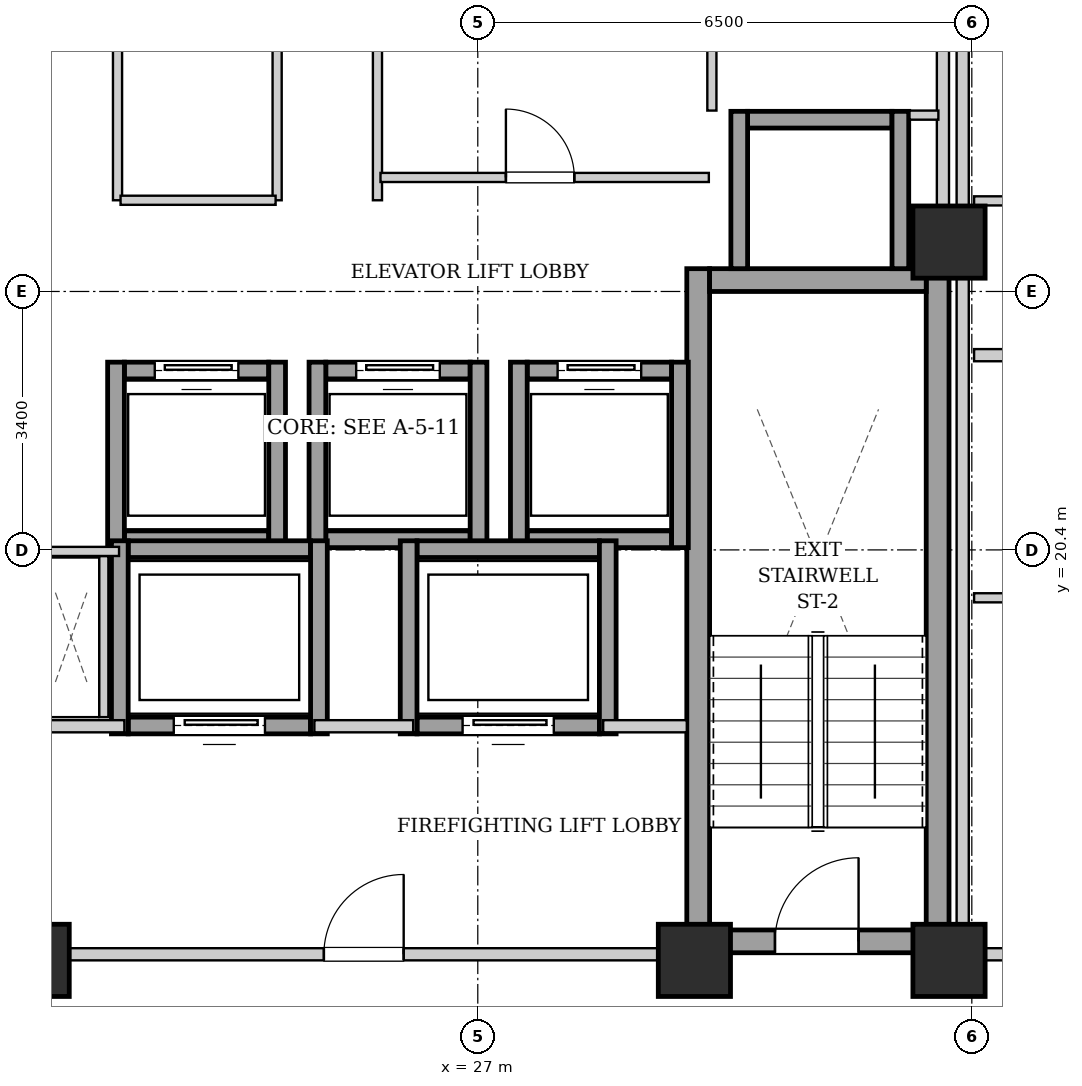
"""IFC4 building model, lengths in metres.
Left out: names, types, materials, properties, quantities, classifications, styles, units other than length and angle.
Written with IfcOpenShell. Run it as: python <this file> out.ifc"""

import sys

from ifc_helpers import new_model, si_unit, direction, frame, frame_2d, origin, origin_2d, place, context, subcontext, project, spatial, rectangle, extrude, element, fill, save


model = new_model("IFC4")
c1 = context("Model", 3, precision=1e-05, world=origin(), true_north=direction((0.0, 1.0)))
c2 = subcontext(c1, "Body", "Model", "MODEL_VIEW")
j1 = project(units=[si_unit("LENGTHUNIT", "METRE"), si_unit("PLANEANGLEUNIT", "RADIAN")], contexts=[c1])
p1 = place(None, origin())
s1 = spatial("IfcSite", under=j1, at=p1, CompositionType="ELEMENT")
p2 = place(p1, origin())
s2 = spatial("IfcBuilding", under=s1, at=p2, CompositionType="ELEMENT")
p3 = place(p2, frame((0.0, 0.0, 166.65)))
s3 = spatial("IfcBuildingStorey", under=s2, at=p3, CompositionType="ELEMENT", Elevation=166.65)
for number, where, z_axis, x_axis in (
    (1, (21.15, 15.0, 0.0), (0.0, 0.0, 1.0), (1.0, 0.0, 0.0)),
    (2, (29.85, 15.0, 0.0), (0.0, 0.0, 1.0), (1.0, 0.0, 0.0)),
    (3, (33.2, 15.0, 0.0), (0.0, 0.0, 1.0), (1.0, 0.0, 0.0)),
    (4, (33.2, 24.45, 0.0), (0.0, 0.0, 1.0), (1.0, 0.0, 0.0)),
):
    element("IfcColumn", number, at=place(p3, frame(where, z_axis=z_axis, x_axis=x_axis)), inside=s3, PredefinedType="COLUMN", context=c2, shape_type="SweptSolid", body=[
        extrude(rectangle(XDim=0.95, YDim=0.95, at=origin_2d()), origin(), (0.0, 0.0, 1.0), 3.25),
    ])
for number, where, z_axis, x_axis in (
    (5, (29.9, 15.1, 0.0), (0.0, 0.0, 1.0), (0.0, 1.0, 0.0)),
    (6, (33.05, 15.1, 0.0), (0.0, 0.0, 1.0), (0.0, 1.0, 0.0)),
):
    element("IfcWall", number, at=place(p3, frame(where, z_axis=z_axis, x_axis=x_axis)), inside=s3, PredefinedType="SHEAR", context=c2, shape_type="SweptSolid", body=[
        extrude(rectangle(XDim=9.0, YDim=0.3, at=frame_2d((4.5, 0.0))), origin(), (0.0, 0.0, 1.0), 2.93),
    ])
p4 = place(p3, frame((30.05, 23.95, 0.0), z_axis=(0.0, 0.0, 1.0), x_axis=(1.0, 0.0, 0.0)))
e7 = element("IfcWall", 7, at=p4, inside=s3, PredefinedType="SHEAR", context=c2, shape_type="SweptSolid", body=[
    extrude(rectangle(XDim=2.85, YDim=0.3, at=frame_2d((1.425, 0.0))), origin(), (0.0, 0.0, 1.0), 2.93),
])
p5 = place(p3, frame((30.05, 15.25, 0.0), z_axis=(0.0, 0.0, 1.0), x_axis=(1.0, 0.0, 0.0)))
e8 = element("IfcWall", 8, at=p5, inside=s3, PredefinedType="SHEAR", context=c2, shape_type="SweptSolid", body=[
    extrude(rectangle(XDim=2.85, YDim=0.3, at=frame_2d((1.425, 0.0))), origin(), (0.0, 0.0, 1.0), 2.93),
])
p6 = place(p5, frame((0.86, 0.0, 0.0)))
e9 = element("IfcOpeningElement", 9, at=p6, cuts=e8, PredefinedType="OPENING", context=c2, shape_type="SweptSolid", body=[
    extrude(rectangle(XDim=1.1, YDim=2.05, at=frame_2d((0.55, 1.025))), frame((0.0, 0.16, 0.0), z_axis=(0.0, -1.0, 0.0), x_axis=(1.0, 0.0, 0.0)), (0.0, 0.0, 1.0), 0.32),
])
p7 = place(p3, frame((22.35, 20.54, 0.0), z_axis=(0.0, 0.0, 1.0), x_axis=(1.0, 0.0, 0.0)))
e10 = element("IfcWall", 10, at=p7, inside=s3, PredefinedType="SHEAR", context=c2, shape_type="SweptSolid", body=[
    extrude(rectangle(XDim=1.9, YDim=0.22, at=frame_2d((0.95, 0.0))), origin(), (0.0, 0.0, 1.0), 2.93),
])
p8 = place(p3, frame((22.35, 22.76, 0.0), z_axis=(0.0, 0.0, 1.0), x_axis=(1.0, 0.0, 0.0)))
e11 = element("IfcWall", 11, at=p8, inside=s3, PredefinedType="SHEAR", context=c2, shape_type="SweptSolid", body=[
    extrude(rectangle(XDim=1.9, YDim=0.22, at=frame_2d((0.95, 0.0))), origin(), (0.0, 0.0, 1.0), 2.93),
])
p9 = place(p8, frame((0.4, 0.0, 0.0)))
e12 = element("IfcOpeningElement", 12, at=p9, cuts=e11, PredefinedType="OPENING", context=c2, shape_type="SweptSolid", body=[
    extrude(rectangle(XDim=1.1, YDim=2.15, at=frame_2d((0.55, 1.075))), frame((0.0, 0.12, 0.0), z_axis=(0.0, -1.0, 0.0), x_axis=(1.0, 0.0, 0.0)), (0.0, 0.0, 1.0), 0.24),
])
for number, where, z_axis, x_axis in (
    (13, (22.24, 20.43, 0.0), (0.0, 0.0, 1.0), (0.0, 1.0, 0.0)),
    (14, (24.36, 20.43, 0.0), (0.0, 0.0, 1.0), (0.0, 1.0, 0.0)),
):
    element("IfcWall", number, at=place(p3, frame(where, z_axis=z_axis, x_axis=x_axis)), inside=s3, PredefinedType="SHEAR", context=c2, shape_type="SweptSolid", body=[
        extrude(rectangle(XDim=2.44, YDim=0.22, at=frame_2d((1.22, 0.0))), origin(), (0.0, 0.0, 1.0), 2.93),
    ])
p10 = place(p3, frame((25.0, 20.54, 0.0), z_axis=(0.0, 0.0, 1.0), x_axis=(1.0, 0.0, 0.0)))
e15 = element("IfcWall", 15, at=p10, inside=s3, PredefinedType="SHEAR", context=c2, shape_type="SweptSolid", body=[
    extrude(rectangle(XDim=1.9, YDim=0.22, at=frame_2d((0.95, 0.0))), origin(), (0.0, 0.0, 1.0), 2.93),
])
p11 = place(p3, frame((25.0, 22.76, 0.0), z_axis=(0.0, 0.0, 1.0), x_axis=(1.0, 0.0, 0.0)))
e16 = element("IfcWall", 16, at=p11, inside=s3, PredefinedType="SHEAR", context=c2, shape_type="SweptSolid", body=[
    extrude(rectangle(XDim=1.9, YDim=0.22, at=frame_2d((0.95, 0.0))), origin(), (0.0, 0.0, 1.0), 2.93),
])
p12 = place(p11, frame((0.4, 0.0, 0.0)))
e17 = element("IfcOpeningElement", 17, at=p12, cuts=e16, PredefinedType="OPENING", context=c2, shape_type="SweptSolid", body=[
    extrude(rectangle(XDim=1.1, YDim=2.15, at=frame_2d((0.55, 1.075))), frame((0.0, 0.12, 0.0), z_axis=(0.0, -1.0, 0.0), x_axis=(1.0, 0.0, 0.0)), (0.0, 0.0, 1.0), 0.24),
])
for number, where, z_axis, x_axis in (
    (18, (24.89, 20.43, 0.0), (0.0, 0.0, 1.0), (0.0, 1.0, 0.0)),
    (19, (27.01, 20.43, 0.0), (0.0, 0.0, 1.0), (0.0, 1.0, 0.0)),
):
    element("IfcWall", number, at=place(p3, frame(where, z_axis=z_axis, x_axis=x_axis)), inside=s3, PredefinedType="SHEAR", context=c2, shape_type="SweptSolid", body=[
        extrude(rectangle(XDim=2.44, YDim=0.22, at=frame_2d((1.22, 0.0))), origin(), (0.0, 0.0, 1.0), 2.93),
    ])
p13 = place(p3, frame((27.65, 20.54, 0.0), z_axis=(0.0, 0.0, 1.0), x_axis=(1.0, 0.0, 0.0)))
e20 = element("IfcWall", 20, at=p13, inside=s3, PredefinedType="SHEAR", context=c2, shape_type="SweptSolid", body=[
    extrude(rectangle(XDim=1.9, YDim=0.22, at=frame_2d((0.95, 0.0))), origin(), (0.0, 0.0, 1.0), 2.93),
])
p14 = place(p3, frame((27.65, 22.76, 0.0), z_axis=(0.0, 0.0, 1.0), x_axis=(1.0, 0.0, 0.0)))
e21 = element("IfcWall", 21, at=p14, inside=s3, PredefinedType="SHEAR", context=c2, shape_type="SweptSolid", body=[
    extrude(rectangle(XDim=1.9, YDim=0.22, at=frame_2d((0.95, 0.0))), origin(), (0.0, 0.0, 1.0), 2.93),
])
p15 = place(p14, frame((0.4, 0.0, 0.0)))
e22 = element("IfcOpeningElement", 22, at=p15, cuts=e21, PredefinedType="OPENING", context=c2, shape_type="SweptSolid", body=[
    extrude(rectangle(XDim=1.1, YDim=2.15, at=frame_2d((0.55, 1.075))), frame((0.0, 0.12, 0.0), z_axis=(0.0, -1.0, 0.0), x_axis=(1.0, 0.0, 0.0)), (0.0, 0.0, 1.0), 0.24),
])
for number, where, z_axis, x_axis in (
    (23, (27.54, 20.43, 0.0), (0.0, 0.0, 1.0), (0.0, 1.0, 0.0)),
    (24, (29.66, 20.43, 0.0), (0.0, 0.0, 1.0), (0.0, 1.0, 0.0)),
):
    element("IfcWall", number, at=place(p3, frame(where, z_axis=z_axis, x_axis=x_axis)), inside=s3, PredefinedType="SHEAR", context=c2, shape_type="SweptSolid", body=[
        extrude(rectangle(XDim=2.44, YDim=0.22, at=frame_2d((1.22, 0.0))), origin(), (0.0, 0.0, 1.0), 2.93),
    ])
p16 = place(p3, frame((30.55, 26.06, 0.0), z_axis=(0.0, 0.0, 1.0), x_axis=(1.0, 0.0, 0.0)))
e25 = element("IfcWall", 25, at=p16, inside=s3, PredefinedType="SHEAR", context=c2, shape_type="SweptSolid", body=[
    extrude(rectangle(XDim=1.9, YDim=0.22, at=frame_2d((0.95, 0.0))), origin(), (0.0, 0.0, 1.0), 2.93),
])
for number, where, z_axis, x_axis in (
    (26, (30.44, 24.1, 0.0), (0.0, 0.0, 1.0), (0.0, 1.0, 0.0)),
    (27, (32.56, 24.1, 0.0), (0.0, 0.0, 1.0), (0.0, 1.0, 0.0)),
):
    element("IfcWall", number, at=place(p3, frame(where, z_axis=z_axis, x_axis=x_axis)), inside=s3, PredefinedType="SHEAR", context=c2, shape_type="SweptSolid", body=[
        extrude(rectangle(XDim=2.07, YDim=0.22, at=frame_2d((1.035, 0.0))), origin(), (0.0, 0.0, 1.0), 2.93),
    ])
p17 = place(p3, frame((22.4, 18.09, 0.0), z_axis=(0.0, 0.0, 1.0), x_axis=(1.0, 0.0, 0.0)))
e28 = element("IfcWall", 28, at=p17, inside=s3, PredefinedType="SHEAR", context=c2, shape_type="SweptSolid", body=[
    extrude(rectangle(XDim=2.4, YDim=0.22, at=frame_2d((1.2, 0.0))), origin(), (0.0, 0.0, 1.0), 2.93),
])
p18 = place(p17, frame((0.6, 0.0, 0.0)))
e29 = element("IfcOpeningElement", 29, at=p18, cuts=e28, PredefinedType="OPENING", context=c2, shape_type="SweptSolid", body=[
    extrude(rectangle(XDim=1.2, YDim=2.15, at=frame_2d((0.6, 1.075))), frame((0.0, 0.12, 0.0), z_axis=(0.0, -1.0, 0.0), x_axis=(1.0, 0.0, 0.0)), (0.0, 0.0, 1.0), 0.24),
])
p19 = place(p3, frame((22.4, 20.41, 0.0), z_axis=(0.0, 0.0, 1.0), x_axis=(1.0, 0.0, 0.0)))
e30 = element("IfcWall", 30, at=p19, inside=s3, PredefinedType="SHEAR", context=c2, shape_type="SweptSolid", body=[
    extrude(rectangle(XDim=2.4, YDim=0.22, at=frame_2d((1.2, 0.0))), origin(), (0.0, 0.0, 1.0), 2.93),
])
for number, where, z_axis, x_axis in (
    (31, (22.29, 17.98, 0.0), (0.0, 0.0, 1.0), (0.0, 1.0, 0.0)),
    (32, (24.91, 17.98, 0.0), (0.0, 0.0, 1.0), (0.0, 1.0, 0.0)),
):
    element("IfcWall", number, at=place(p3, frame(where, z_axis=z_axis, x_axis=x_axis)), inside=s3, PredefinedType="SHEAR", context=c2, shape_type="SweptSolid", body=[
        extrude(rectangle(XDim=2.54, YDim=0.22, at=frame_2d((1.27, 0.0))), origin(), (0.0, 0.0, 1.0), 2.93),
    ])
p20 = place(p3, frame((26.2, 18.09, 0.0), z_axis=(0.0, 0.0, 1.0), x_axis=(1.0, 0.0, 0.0)))
e33 = element("IfcWall", 33, at=p20, inside=s3, PredefinedType="SHEAR", context=c2, shape_type="SweptSolid", body=[
    extrude(rectangle(XDim=2.4, YDim=0.22, at=frame_2d((1.2, 0.0))), origin(), (0.0, 0.0, 1.0), 2.93),
])
p21 = place(p20, frame((0.6, 0.0, 0.0)))
e34 = element("IfcOpeningElement", 34, at=p21, cuts=e33, PredefinedType="OPENING", context=c2, shape_type="SweptSolid", body=[
    extrude(rectangle(XDim=1.2, YDim=2.15, at=frame_2d((0.6, 1.075))), frame((0.0, 0.12, 0.0), z_axis=(0.0, -1.0, 0.0), x_axis=(1.0, 0.0, 0.0)), (0.0, 0.0, 1.0), 0.24),
])
p22 = place(p3, frame((26.2, 20.41, 0.0), z_axis=(0.0, 0.0, 1.0), x_axis=(1.0, 0.0, 0.0)))
e35 = element("IfcWall", 35, at=p22, inside=s3, PredefinedType="SHEAR", context=c2, shape_type="SweptSolid", body=[
    extrude(rectangle(XDim=2.4, YDim=0.22, at=frame_2d((1.2, 0.0))), origin(), (0.0, 0.0, 1.0), 2.93),
])
for number, where, z_axis, x_axis in (
    (36, (26.09, 17.98, 0.0), (0.0, 0.0, 1.0), (0.0, 1.0, 0.0)),
    (37, (28.71, 17.98, 0.0), (0.0, 0.0, 1.0), (0.0, 1.0, 0.0)),
):
    element("IfcWall", number, at=place(p3, frame(where, z_axis=z_axis, x_axis=x_axis)), inside=s3, PredefinedType="SHEAR", context=c2, shape_type="SweptSolid", body=[
        extrude(rectangle(XDim=2.54, YDim=0.22, at=frame_2d((1.27, 0.0))), origin(), (0.0, 0.0, 1.0), 2.93),
    ])
p23 = place(p3, frame((21.25, 15.08, 0.0), z_axis=(0.0, 0.0, 1.0), x_axis=(1.0, 0.0, 0.0)))
e38 = element("IfcWall", 38, at=p23, inside=s3, PredefinedType="PARTITIONING", context=c2, shape_type="SweptSolid", body=[
    extrude(rectangle(XDim=8.5, YDim=0.16, at=frame_2d((4.25, 0.0))), origin(), (0.0, 0.0, 1.0), 2.382),
])
p24 = place(p23, frame((3.725, 0.0, 0.0)))
e39 = element("IfcOpeningElement", 39, at=p24, cuts=e38, PredefinedType="OPENING", context=c2, shape_type="SweptSolid", body=[
    extrude(rectangle(XDim=1.05, YDim=2.05, at=frame_2d((0.525, 1.025))), frame((0.0, 0.09, 0.0), z_axis=(0.0, -1.0, 0.0), x_axis=(1.0, 0.0, 0.0)), (0.0, 0.0, 1.0), 0.18),
])
p25 = place(p3, frame((21.25, 18.08, 0.0), z_axis=(0.0, 0.0, 1.0), x_axis=(1.0, 0.0, 0.0)))
e40 = element("IfcWall", 40, at=p25, inside=s3, PredefinedType="PARTITIONING", context=c2, shape_type="SweptSolid", body=[
    extrude(rectangle(XDim=1.1, YDim=0.16, at=frame_2d((0.55, 0.0))), origin(), (0.0, 0.0, 1.0), 2.93),
])
p26 = place(p3, frame((24.85, 18.08, 0.0), z_axis=(0.0, 0.0, 1.0), x_axis=(1.0, 0.0, 0.0)))
e41 = element("IfcWall", 41, at=p26, inside=s3, PredefinedType="PARTITIONING", context=c2, shape_type="SweptSolid", body=[
    extrude(rectangle(XDim=1.3, YDim=0.16, at=frame_2d((0.65, 0.0))), origin(), (0.0, 0.0, 1.0), 2.93),
])
p27 = place(p3, frame((28.65, 18.08, 0.0), z_axis=(0.0, 0.0, 1.0), x_axis=(1.0, 0.0, 0.0)))
e42 = element("IfcWall", 42, at=p27, inside=s3, PredefinedType="PARTITIONING", context=c2, shape_type="SweptSolid", body=[
    extrude(rectangle(XDim=1.1, YDim=0.16, at=frame_2d((0.55, 0.0))), origin(), (0.0, 0.0, 1.0), 2.93),
])
p28 = place(p3, frame((33.12, 24.12, 0.0), z_axis=(0.0, 0.0, 1.0), x_axis=(0.0, 1.0, 0.0)))
e43 = element("IfcWall", 43, at=p28, inside=s3, PredefinedType="PARTITIONING", context=c2, shape_type="SweptSolid", body=[
    extrude(rectangle(XDim=4.76, YDim=0.16, at=frame_2d((2.38, 0.0))), origin(), (0.0, 0.0, 1.0), 2.265),
])
p29 = place(p3, frame((22.08, 18.2, 0.0), z_axis=(0.0, 0.0, 1.0), x_axis=(0.0, 1.0, 0.0)))
e44 = element("IfcWall", 44, at=p29, inside=s3, PredefinedType="PARTITIONING", context=c2, shape_type="SweptSolid", body=[
    extrude(rectangle(XDim=2.12, YDim=0.12, at=frame_2d((1.06, 0.0))), origin(), (0.0, 0.0, 1.0), 2.93),
])
p30 = place(p3, frame((22.28, 20.38, 0.0), z_axis=(0.0, 0.0, 1.0), x_axis=(-1.0, 0.0, 0.0)))
e45 = element("IfcWall", 45, at=p30, inside=s3, PredefinedType="PARTITIONING", context=c2, shape_type="SweptSolid", body=[
    extrude(rectangle(XDim=1.02, YDim=0.12, at=frame_2d((0.51, 0.0))), origin(), (0.0, 0.0, 1.0), 2.93),
])
for number, where, z_axis, x_axis in (
    (46, (24.36, 25.0, 0.0), (0.0, 0.0, 1.0), (0.0, 1.0, 0.0)),
    (47, (25.68, 25.0, 0.0), (0.0, 0.0, 1.0), (0.0, 1.0, 0.0)),
):
    element("IfcWall", number, at=place(p3, frame(where, z_axis=z_axis, x_axis=x_axis)), inside=s3, PredefinedType="PARTITIONING", context=c2, shape_type="SweptSolid", body=[
        extrude(rectangle(XDim=3.87, YDim=0.12, at=frame_2d((1.935, 0.0))), origin(), (0.0, 0.0, 1.0), 2.93),
    ])
p31 = place(p3, frame((30.08, 26.18, 0.0), z_axis=(0.0, 0.0, 1.0), x_axis=(0.0, 1.0, 0.0)))
e48 = element("IfcWall", 48, at=p31, inside=s3, PredefinedType="PARTITIONING", context=c2, shape_type="SweptSolid", body=[
    extrude(rectangle(XDim=2.68, YDim=0.12, at=frame_2d((1.34, 0.0))), origin(), (0.0, 0.0, 1.0), 2.93),
])
p32 = place(p3, frame((32.68, 26.12, 0.0), z_axis=(0.0, 0.0, 1.0), x_axis=(1.0, 0.0, 0.0)))
e49 = element("IfcWall", 49, at=p32, inside=s3, PredefinedType="PARTITIONING", context=c2, shape_type="SweptSolid", body=[
    extrude(rectangle(XDim=0.38, YDim=0.12, at=frame_2d((0.19, 0.0))), origin(), (0.0, 0.0, 1.0), 2.93),
])
p33 = place(p3, frame((22.26, 25.0, 0.0), z_axis=(0.0, 0.0, 1.0), x_axis=(0.0, 1.0, 0.0)))
e50 = element("IfcWall", 50, at=p33, inside=s3, PredefinedType="PARTITIONING", context=c2, shape_type="SweptSolid", body=[
    extrude(rectangle(XDim=3.86, YDim=0.12, at=frame_2d((1.93, 0.0))), origin(), (0.0, 0.0, 1.0), 2.93),
])
p34 = place(p3, frame((22.3, 25.0, 0.0), z_axis=(0.0, 0.0, 1.0), x_axis=(1.0, 0.0, 0.0)))
e51 = element("IfcWall", 51, at=p34, inside=s3, PredefinedType="PARTITIONING", context=c2, shape_type="SweptSolid", body=[
    extrude(rectangle(XDim=2.04, YDim=0.12, at=frame_2d((1.02, 0.0))), origin(), (0.0, 0.0, 1.0), 2.93),
])
p35 = place(p3, frame((25.72, 25.3, 0.0), z_axis=(0.0, 0.0, 1.0), x_axis=(1.0, 0.0, 0.0)))
e52 = element("IfcWall", 52, at=p35, inside=s3, PredefinedType="PARTITIONING", context=c2, shape_type="SweptSolid", body=[
    extrude(rectangle(XDim=4.32, YDim=0.12, at=frame_2d((2.16, 0.0))), origin(), (0.0, 0.0, 1.0), 2.93),
])
p36 = place(p35, frame((1.65, 0.0, 0.0)))
e53 = element("IfcOpeningElement", 53, at=p36, cuts=e52, PredefinedType="OPENING", context=c2, shape_type="SweptSolid", body=[
    extrude(rectangle(XDim=0.9, YDim=2.05, at=frame_2d((0.45, 1.025))), frame((0.0, 0.07, 0.0), z_axis=(0.0, -1.0, 0.0), x_axis=(1.0, 0.0, 0.0)), (0.0, 0.0, 1.0), 0.14),
])
p37 = place(p3, frame((33.38, 15.08, 0.0), z_axis=(0.0, 0.0, 1.0), x_axis=(1.0, 0.0, 0.0)))
e54 = element("IfcWall", 54, at=p37, inside=s3, PredefinedType="PARTITIONING", context=c2, shape_type="SweptSolid", body=[
    extrude(rectangle(XDim=6.64, YDim=0.16, at=frame_2d((3.32, 0.0))), origin(), (0.0, 0.0, 1.0), 2.382),
])
p38 = place(p37, frame((0.9, 0.0, 0.0)))
e55 = element("IfcOpeningElement", 55, at=p38, cuts=e54, PredefinedType="OPENING", context=c2, shape_type="SweptSolid", body=[
    extrude(rectangle(XDim=0.95, YDim=2.1, at=frame_2d((0.475, 1.05))), frame((0.0, 0.09, 0.0), z_axis=(0.0, -1.0, 0.0), x_axis=(1.0, 0.0, 0.0)), (0.0, 0.0, 1.0), 0.18),
])
p39 = place(p3, frame((33.53, 22.962, 0.0), z_axis=(0.0, 0.0, 1.0), x_axis=(1.0, 0.0, 0.0)))
e56 = element("IfcWall", 56, at=p39, inside=s3, PredefinedType="PARTITIONING", context=c2, shape_type="SweptSolid", body=[
    extrude(rectangle(XDim=6.49, YDim=0.16, at=frame_2d((3.245, 0.0))), origin(), (0.0, 0.0, 1.0), 2.93),
])
p40 = place(p3, frame((33.53, 19.77, 0.0), z_axis=(0.0, 0.0, 1.0), x_axis=(1.0, 0.0, 0.0)))
e57 = element("IfcWall", 57, at=p40, inside=s3, PredefinedType="PARTITIONING", context=c2, shape_type="SweptSolid", body=[
    extrude(rectangle(XDim=2.45, YDim=0.12, at=frame_2d((1.225, 0.0))), origin(), (0.0, 0.0, 1.0), 2.93),
])
p41 = place(p40, frame((0.795, 0.0, 0.0)))
e58 = element("IfcOpeningElement", 58, at=p41, cuts=e57, PredefinedType="OPENING", context=c2, shape_type="SweptSolid", body=[
    extrude(rectangle(XDim=0.86, YDim=2.05, at=frame_2d((0.43, 1.025))), frame((0.0, 0.07, 0.0), z_axis=(0.0, -1.0, 0.0), x_axis=(1.0, 0.0, 0.0)), (0.0, 0.0, 1.0), 0.14),
])
p42 = place(p3, frame((33.53, 24.992, 0.0), z_axis=(0.0, 0.0, 1.0), x_axis=(1.0, 0.0, 0.0)))
e59 = element("IfcWall", 59, at=p42, inside=s3, PredefinedType="PARTITIONING", context=c2, shape_type="SweptSolid", body=[
    extrude(rectangle(XDim=2.45, YDim=0.12, at=frame_2d((1.225, 0.0))), origin(), (0.0, 0.0, 1.0), 2.93),
])
p43 = place(p42, frame((0.795, 0.0, 0.0)))
e60 = element("IfcOpeningElement", 60, at=p43, cuts=e59, PredefinedType="OPENING", context=c2, shape_type="SweptSolid", body=[
    extrude(rectangle(XDim=0.86, YDim=2.05, at=frame_2d((0.43, 1.025))), frame((0.0, 0.07, 0.0), z_axis=(0.0, -1.0, 0.0), x_axis=(1.0, 0.0, 0.0)), (0.0, 0.0, 1.0), 0.14),
])
p44 = place(p3, frame((33.38, 15.02, 0.0), z_axis=(0.0, 0.0, 1.0), x_axis=(0.0, 1.0, 0.0)))
e61 = element("IfcWall", 61, at=p44, inside=s3, PredefinedType="PARTITIONING", context=c2, shape_type="SweptSolid", body=[
    extrude(rectangle(XDim=13.98, YDim=0.16, at=frame_2d((6.99, 0.0))), origin(), (0.0, 0.0, 1.0), 2.265),
])
p45 = place(p6, origin())
e62 = element("IfcDoor", 62, at=p45, inside=s3, OperationType="SINGLE_SWING_RIGHT", PredefinedType="DOOR", context=c2, shape_type="SweptSolid", body=[
    extrude(rectangle(XDim=1.1, YDim=2.05, at=frame_2d((0.55, 1.025))), frame((0.0, 0.025, 0.0), z_axis=(0.0, -1.0, 0.0), x_axis=(1.0, 0.0, 0.0)), (0.0, 0.0, 1.0), 0.05),
])
fill(e9, e62)
p46 = place(p9, origin())
e63 = element("IfcDoor", 63, at=p46, inside=s3, OperationType="SLIDING_TO_LEFT", PredefinedType="DOOR", context=c2, shape_type="SweptSolid", body=[
    extrude(rectangle(XDim=1.1, YDim=2.15, at=frame_2d((0.55, 1.075))), frame((0.0, 0.025, 0.0), z_axis=(0.0, -1.0, 0.0), x_axis=(1.0, 0.0, 0.0)), (0.0, 0.0, 1.0), 0.05),
])
fill(e12, e63)
p47 = place(p12, origin())
e64 = element("IfcDoor", 64, at=p47, inside=s3, OperationType="SLIDING_TO_LEFT", PredefinedType="DOOR", context=c2, shape_type="SweptSolid", body=[
    extrude(rectangle(XDim=1.1, YDim=2.15, at=frame_2d((0.55, 1.075))), frame((0.0, 0.025, 0.0), z_axis=(0.0, -1.0, 0.0), x_axis=(1.0, 0.0, 0.0)), (0.0, 0.0, 1.0), 0.05),
])
fill(e17, e64)
p48 = place(p15, origin())
e65 = element("IfcDoor", 65, at=p48, inside=s3, OperationType="SLIDING_TO_LEFT", PredefinedType="DOOR", context=c2, shape_type="SweptSolid", body=[
    extrude(rectangle(XDim=1.1, YDim=2.15, at=frame_2d((0.55, 1.075))), frame((0.0, 0.025, 0.0), z_axis=(0.0, -1.0, 0.0), x_axis=(1.0, 0.0, 0.0)), (0.0, 0.0, 1.0), 0.05),
])
fill(e22, e65)
p49 = place(p18, origin())
e66 = element("IfcDoor", 66, at=p49, inside=s3, OperationType="SLIDING_TO_LEFT", PredefinedType="DOOR", context=c2, shape_type="SweptSolid", body=[
    extrude(rectangle(XDim=1.2, YDim=2.15, at=frame_2d((0.6, 1.075))), frame((0.0, 0.025, 0.0), z_axis=(0.0, -1.0, 0.0), x_axis=(1.0, 0.0, 0.0)), (0.0, 0.0, 1.0), 0.05),
])
fill(e29, e66)
p50 = place(p21, origin())
e67 = element("IfcDoor", 67, at=p50, inside=s3, OperationType="SLIDING_TO_LEFT", PredefinedType="DOOR", context=c2, shape_type="SweptSolid", body=[
    extrude(rectangle(XDim=1.2, YDim=2.15, at=frame_2d((0.6, 1.075))), frame((0.0, 0.025, 0.0), z_axis=(0.0, -1.0, 0.0), x_axis=(1.0, 0.0, 0.0)), (0.0, 0.0, 1.0), 0.05),
])
fill(e34, e67)
p51 = place(p24, origin())
e68 = element("IfcDoor", 68, at=p51, inside=s3, OperationType="SINGLE_SWING_RIGHT", PredefinedType="DOOR", context=c2, shape_type="SweptSolid", body=[
    extrude(rectangle(XDim=1.05, YDim=2.05, at=frame_2d((0.525, 1.025))), frame((0.0, 0.025, 0.0), z_axis=(0.0, -1.0, 0.0), x_axis=(1.0, 0.0, 0.0)), (0.0, 0.0, 1.0), 0.05),
])
fill(e39, e68)
p52 = place(p36, origin())
e69 = element("IfcDoor", 69, at=p52, inside=s3, OperationType="SINGLE_SWING_LEFT", PredefinedType="DOOR", context=c2, shape_type="SweptSolid", body=[
    extrude(rectangle(XDim=0.9, YDim=2.05, at=frame_2d((0.45, 1.025))), frame((0.0, 0.025, 0.0), z_axis=(0.0, -1.0, 0.0), x_axis=(1.0, 0.0, 0.0)), (0.0, 0.0, 1.0), 0.05),
])
fill(e53, e69)
save(model, sys.argv[1])
